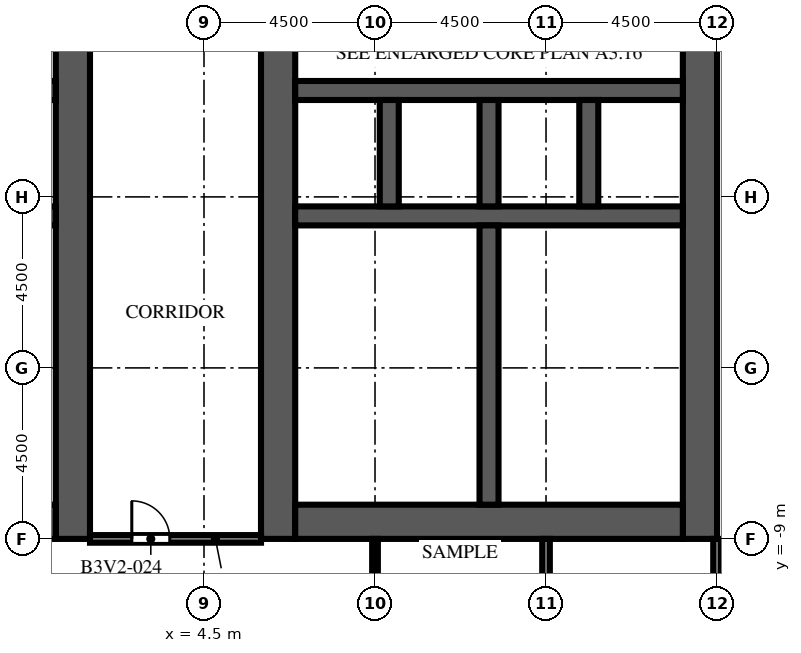
"""IFC4 building model, lengths in metres.
Left out: names, types, materials, properties, quantities, classifications, styles, units other than length and angle.
Written with IfcOpenShell. Run it as: python <this file> out.ifc"""

import sys

from ifc_helpers import new_model, si_unit, direction, frame, frame_2d, origin, place, context, subcontext, project, spatial, rectangle, extrude, element, fill, save


model = new_model("IFC4")
c1 = context("Model", 3, precision=1e-05, world=origin(), true_north=direction((0.0, 1.0)))
c2 = subcontext(c1, "Body", "Model", "MODEL_VIEW")
j1 = project(units=[si_unit("LENGTHUNIT", "METRE"), si_unit("PLANEANGLEUNIT", "RADIAN")], contexts=[c1])
p1 = place(None, origin())
s1 = spatial("IfcSite", under=j1, at=p1, CompositionType="ELEMENT")
p2 = place(p1, origin())
s2 = spatial("IfcBuilding", under=s1, at=p2, CompositionType="ELEMENT")
p3 = place(p2, frame((0.0, 0.0, 102.5)))
s3 = spatial("IfcBuildingStorey", under=s2, at=p3, CompositionType="ELEMENT", Elevation=102.5)
p4 = place(p3, frame((1.05, -9.0, 0.0), z_axis=(0.0, 0.0, 1.0), x_axis=(0.0, 1.0, 0.0)))
e1 = element("IfcWall", 1, at=p4, inside=s3, PredefinedType="SHEAR", context=c2, shape_type="SweptSolid", body=[
    extrude(rectangle(XDim=27.5, YDim=0.9, at=frame_2d((13.75, 0.0))), origin(), (0.0, 0.0, 1.0), 4.1),
])
p5 = place(p4, frame((12.55, 0.0, 0.0)))
e2 = element("IfcOpeningElement", 2, at=p5, cuts=e1, PredefinedType="OPENING", context=c2, shape_type="SweptSolid", body=[
    extrude(rectangle(XDim=2.4, YDim=2.4, at=frame_2d((1.2, 1.2))), frame((0.0, 0.46, 0.0), z_axis=(0.0, -1.0, 0.0), x_axis=(1.0, 0.0, 0.0)), (0.0, 0.0, 1.0), 0.92),
])
p6 = place(p4, frame((3.893, 0.0, 0.0)))
e3 = element("IfcOpeningElement", 3, at=p6, cuts=e1, PredefinedType="OPENING", context=c2, shape_type="SweptSolid", body=[
    extrude(rectangle(XDim=0.923, YDim=2.1, at=frame_2d((0.461, 1.05))), frame((0.0, 0.46, 0.0), z_axis=(0.0, -1.0, 0.0), x_axis=(1.0, 0.0, 0.0)), (0.0, 0.0, 1.0), 0.92),
])
p7 = place(p4, frame((23.427, 0.0, 0.0)))
e4 = element("IfcOpeningElement", 4, at=p7, cuts=e1, PredefinedType="OPENING", context=c2, shape_type="SweptSolid", body=[
    extrude(rectangle(XDim=1.2, YDim=2.1, at=frame_2d((0.6, 1.05))), frame((0.0, 0.46, 0.0), z_axis=(0.0, -1.0, 0.0), x_axis=(1.0, 0.0, 0.0)), (0.0, 0.0, 1.0), 0.92),
])
p8 = place(p3, frame((-9.6, -8.55, 0.0), z_axis=(0.0, 0.0, 1.0), x_axis=(1.0, 0.0, 0.0)))
e5 = element("IfcWall", 5, at=p8, inside=s3, PredefinedType="SHEAR", context=c2, shape_type="SweptSolid", body=[
    extrude(rectangle(XDim=10.2, YDim=0.9, at=frame_2d((5.1, 0.0))), origin(), (0.0, 0.0, 1.0), 4.1),
])
p9 = place(p3, frame((-9.6, -0.5, 0.0), z_axis=(0.0, 0.0, 1.0), x_axis=(1.0, 0.0, 0.0)))
e6 = element("IfcWall", 6, at=p9, inside=s3, PredefinedType="SHEAR", context=c2, shape_type="SweptSolid", body=[
    extrude(rectangle(XDim=10.2, YDim=0.5, at=frame_2d((5.1, 0.0))), origin(), (0.0, 0.0, 1.0), 4.1),
])
p10 = place(p3, frame((-9.6, 2.8, 0.0), z_axis=(0.0, 0.0, 1.0), x_axis=(1.0, 0.0, 0.0)))
e7 = element("IfcWall", 7, at=p10, inside=s3, PredefinedType="SHEAR", context=c2, shape_type="SweptSolid", body=[
    extrude(rectangle(XDim=10.2, YDim=0.5, at=frame_2d((5.1, 0.0))), origin(), (0.0, 0.0, 1.0), 4.1),
])
p11 = place(p10, frame((0.562, 0.0, 0.0)))
e8 = element("IfcOpeningElement", 8, at=p11, cuts=e7, PredefinedType="OPENING", context=c2, shape_type="SweptSolid", body=[
    extrude(rectangle(XDim=1.1, YDim=2.1, at=frame_2d((0.55, 1.05))), frame((0.0, 0.26, 0.0), z_axis=(0.0, -1.0, 0.0), x_axis=(1.0, 0.0, 0.0)), (0.0, 0.0, 1.0), 0.52),
])
p12 = place(p10, frame((3.238, 0.0, 0.0)))
e9 = element("IfcOpeningElement", 9, at=p12, cuts=e7, PredefinedType="OPENING", context=c2, shape_type="SweptSolid", body=[
    extrude(rectangle(XDim=1.1, YDim=2.1, at=frame_2d((0.55, 1.05))), frame((0.0, 0.26, 0.0), z_axis=(0.0, -1.0, 0.0), x_axis=(1.0, 0.0, 0.0)), (0.0, 0.0, 1.0), 0.52),
])
p13 = place(p10, frame((8.538, 0.0, 0.0)))
e10 = element("IfcOpeningElement", 10, at=p13, cuts=e7, PredefinedType="OPENING", context=c2, shape_type="SweptSolid", body=[
    extrude(rectangle(XDim=1.1, YDim=2.1, at=frame_2d((0.55, 1.05))), frame((0.0, 0.26, 0.0), z_axis=(0.0, -1.0, 0.0), x_axis=(1.0, 0.0, 0.0)), (0.0, 0.0, 1.0), 0.52),
])
p14 = place(p3, frame((6.45, -9.0, 0.0), z_axis=(0.0, 0.0, 1.0), x_axis=(0.0, 1.0, 0.0)))
e11 = element("IfcWall", 11, at=p14, inside=s3, PredefinedType="SHEAR", context=c2, shape_type="SweptSolid", body=[
    extrude(rectangle(XDim=27.5, YDim=0.9, at=frame_2d((13.75, 0.0))), origin(), (0.0, 0.0, 1.0), 4.1),
])
p15 = place(p14, frame((12.55, 0.0, 0.0)))
e12 = element("IfcOpeningElement", 12, at=p15, cuts=e11, PredefinedType="OPENING", context=c2, shape_type="SweptSolid", body=[
    extrude(rectangle(XDim=2.4, YDim=2.4, at=frame_2d((1.2, 1.2))), frame((0.0, 0.46, 0.0), z_axis=(0.0, -1.0, 0.0), x_axis=(1.0, 0.0, 0.0)), (0.0, 0.0, 1.0), 0.92),
])
p16 = place(p14, frame((3.893, 0.0, 0.0)))
e13 = element("IfcOpeningElement", 13, at=p16, cuts=e11, PredefinedType="OPENING", context=c2, shape_type="SweptSolid", body=[
    extrude(rectangle(XDim=0.923, YDim=2.1, at=frame_2d((0.461, 1.05))), frame((0.0, 0.46, 0.0), z_axis=(0.0, -1.0, 0.0), x_axis=(1.0, 0.0, 0.0)), (0.0, 0.0, 1.0), 0.92),
])
p17 = place(p14, frame((23.427, 0.0, 0.0)))
e14 = element("IfcOpeningElement", 14, at=p17, cuts=e11, PredefinedType="OPENING", context=c2, shape_type="SweptSolid", body=[
    extrude(rectangle(XDim=1.2, YDim=2.1, at=frame_2d((0.6, 1.05))), frame((0.0, 0.46, 0.0), z_axis=(0.0, -1.0, 0.0), x_axis=(1.0, 0.0, 0.0)), (0.0, 0.0, 1.0), 0.92),
])
p18 = place(p3, frame((17.55, -9.0, 0.0), z_axis=(0.0, 0.0, 1.0), x_axis=(0.0, 1.0, 0.0)))
e15 = element("IfcWall", 15, at=p18, inside=s3, PredefinedType="SHEAR", context=c2, shape_type="SweptSolid", body=[
    extrude(rectangle(XDim=27.5, YDim=0.9, at=frame_2d((13.75, 0.0))), origin(), (0.0, 0.0, 1.0), 4.1),
])
p19 = place(p18, frame((12.55, 0.0, 0.0)))
e16 = element("IfcOpeningElement", 16, at=p19, cuts=e15, PredefinedType="OPENING", context=c2, shape_type="SweptSolid", body=[
    extrude(rectangle(XDim=2.4, YDim=2.4, at=frame_2d((1.2, 1.2))), frame((0.0, 0.46, 0.0), z_axis=(0.0, -1.0, 0.0), x_axis=(1.0, 0.0, 0.0)), (0.0, 0.0, 1.0), 0.92),
])
p20 = place(p18, frame((6.825, 0.0, 0.0)))
e17 = element("IfcOpeningElement", 17, at=p20, cuts=e15, PredefinedType="OPENING", context=c2, shape_type="SweptSolid", body=[
    extrude(rectangle(XDim=1.2, YDim=2.1, at=frame_2d((0.6, 1.05))), frame((0.0, 0.46, 0.0), z_axis=(0.0, -1.0, 0.0), x_axis=(1.0, 0.0, 0.0)), (0.0, 0.0, 1.0), 0.92),
])
p21 = place(p18, frame((19.475, 0.0, 0.0)))
e18 = element("IfcOpeningElement", 18, at=p21, cuts=e15, PredefinedType="OPENING", context=c2, shape_type="SweptSolid", body=[
    extrude(rectangle(XDim=1.2, YDim=2.1, at=frame_2d((0.6, 1.05))), frame((0.0, 0.46, 0.0), z_axis=(0.0, -1.0, 0.0), x_axis=(1.0, 0.0, 0.0)), (0.0, 0.0, 1.0), 0.92),
])
p22 = place(p3, frame((6.9, -8.55, 0.0), z_axis=(0.0, 0.0, 1.0), x_axis=(1.0, 0.0, 0.0)))
e19 = element("IfcWall", 19, at=p22, inside=s3, PredefinedType="SHEAR", context=c2, shape_type="SweptSolid", body=[
    extrude(rectangle(XDim=10.2, YDim=0.9, at=frame_2d((5.1, 0.0))), origin(), (0.0, 0.0, 1.0), 4.1),
])
p23 = place(p3, frame((6.9, -0.5, 0.0), z_axis=(0.0, 0.0, 1.0), x_axis=(1.0, 0.0, 0.0)))
e20 = element("IfcWall", 20, at=p23, inside=s3, PredefinedType="SHEAR", context=c2, shape_type="SweptSolid", body=[
    extrude(rectangle(XDim=10.2, YDim=0.5, at=frame_2d((5.1, 0.0))), origin(), (0.0, 0.0, 1.0), 4.1),
])
p24 = place(p3, frame((6.9, 2.8, 0.0), z_axis=(0.0, 0.0, 1.0), x_axis=(1.0, 0.0, 0.0)))
e21 = element("IfcWall", 21, at=p24, inside=s3, PredefinedType="SHEAR", context=c2, shape_type="SweptSolid", body=[
    extrude(rectangle(XDim=10.2, YDim=0.5, at=frame_2d((5.1, 0.0))), origin(), (0.0, 0.0, 1.0), 4.1),
])
p25 = place(p24, frame((0.562, 0.0, 0.0)))
e22 = element("IfcOpeningElement", 22, at=p25, cuts=e21, PredefinedType="OPENING", context=c2, shape_type="SweptSolid", body=[
    extrude(rectangle(XDim=1.1, YDim=2.1, at=frame_2d((0.55, 1.05))), frame((0.0, 0.26, 0.0), z_axis=(0.0, -1.0, 0.0), x_axis=(1.0, 0.0, 0.0)), (0.0, 0.0, 1.0), 0.52),
])
p26 = place(p24, frame((3.238, 0.0, 0.0)))
e23 = element("IfcOpeningElement", 23, at=p26, cuts=e21, PredefinedType="OPENING", context=c2, shape_type="SweptSolid", body=[
    extrude(rectangle(XDim=1.1, YDim=2.1, at=frame_2d((0.55, 1.05))), frame((0.0, 0.26, 0.0), z_axis=(0.0, -1.0, 0.0), x_axis=(1.0, 0.0, 0.0)), (0.0, 0.0, 1.0), 0.52),
])
p27 = place(p24, frame((8.538, 0.0, 0.0)))
e24 = element("IfcOpeningElement", 24, at=p27, cuts=e21, PredefinedType="OPENING", context=c2, shape_type="SweptSolid", body=[
    extrude(rectangle(XDim=1.1, YDim=2.1, at=frame_2d((0.55, 1.05))), frame((0.0, 0.26, 0.0), z_axis=(0.0, -1.0, 0.0), x_axis=(1.0, 0.0, 0.0)), (0.0, 0.0, 1.0), 0.52),
])
for number, where, z_axis, x_axis in (
    (25, (9.375, -0.25, 0.0), (0.0, 0.0, 1.0), (0.0, 1.0, 0.0)),
    (26, (12.0, -0.25, 0.0), (0.0, 0.0, 1.0), (0.0, 1.0, 0.0)),
    (27, (14.625, -0.25, 0.0), (0.0, 0.0, 1.0), (0.0, 1.0, 0.0)),
):
    element("IfcWall", number, at=place(p3, frame(where, z_axis=z_axis, x_axis=x_axis)), inside=s3, PredefinedType="SHEAR", context=c2, shape_type="SweptSolid", body=[
        extrude(rectangle(XDim=2.8, YDim=0.5, at=frame_2d((1.4, 0.0))), origin(), (0.0, 0.0, 1.0), 4.1),
    ])
p28 = place(p3, frame((12.0, -8.1, 0.0), z_axis=(0.0, 0.0, 1.0), x_axis=(0.0, 1.0, 0.0)))
e28 = element("IfcWall", 28, at=p28, inside=s3, PredefinedType="SHEAR", context=c2, shape_type="SweptSolid", body=[
    extrude(rectangle(XDim=7.35, YDim=0.5, at=frame_2d((3.675, 0.0))), origin(), (0.0, 0.0, 1.0), 4.1),
])
p29 = place(p3, frame((-4.25, -5.307, 0.0), z_axis=(0.0, 0.0, 1.0), x_axis=(1.0, 0.0, 0.0)))
e29 = element("IfcWall", 29, at=p29, inside=s3, PredefinedType="PARTITIONING", context=c2, shape_type="SweptSolid", body=[
    extrude(rectangle(XDim=4.85, YDim=0.1, at=frame_2d((2.425, 0.0))), origin(), (0.0, 0.0, 1.0), 3.65),
])
p30 = place(p29, frame((1.925, 0.0, 0.0)))
e30 = element("IfcOpeningElement", 30, at=p30, cuts=e29, PredefinedType="OPENING", context=c2, shape_type="SweptSolid", body=[
    extrude(rectangle(XDim=1.0, YDim=2.1, at=frame_2d((0.5, 1.05))), frame((0.0, 0.06, 0.0), z_axis=(0.0, -1.0, 0.0), x_axis=(1.0, 0.0, 0.0)), (0.0, 0.0, 1.0), 0.12),
])
p31 = place(p3, frame((-2.407, -3.984, 0.0), z_axis=(0.0, 0.0, 1.0), x_axis=(1.0, 0.0, 0.0)))
e31 = element("IfcWall", 31, at=p31, inside=s3, PredefinedType="PARTITIONING", context=c2, shape_type="SweptSolid", body=[
    extrude(rectangle(XDim=3.007, YDim=0.1, at=frame_2d((1.503, 0.0))), origin(), (0.0, 0.0, 1.0), 3.65),
])
p32 = place(p31, frame((1.003, 0.0, 0.0)))
e32 = element("IfcOpeningElement", 32, at=p32, cuts=e31, PredefinedType="OPENING", context=c2, shape_type="SweptSolid", body=[
    extrude(rectangle(XDim=1.0, YDim=2.1, at=frame_2d((0.5, 1.05))), frame((0.0, 0.06, 0.0), z_axis=(0.0, -1.0, 0.0), x_axis=(1.0, 0.0, 0.0)), (0.0, 0.0, 1.0), 0.12),
])
p33 = place(p3, frame((6.9, -5.307, 0.0), z_axis=(0.0, 0.0, 1.0), x_axis=(1.0, 0.0, 0.0)))
e33 = element("IfcWall", 33, at=p33, inside=s3, PredefinedType="PARTITIONING", context=c2, shape_type="SweptSolid", body=[
    extrude(rectangle(XDim=4.85, YDim=0.1, at=frame_2d((2.425, 0.0))), origin(), (0.0, 0.0, 1.0), 3.65),
])
p34 = place(p33, frame((1.925, 0.0, 0.0)))
e34 = element("IfcOpeningElement", 34, at=p34, cuts=e33, PredefinedType="OPENING", context=c2, shape_type="SweptSolid", body=[
    extrude(rectangle(XDim=1.0, YDim=2.1, at=frame_2d((0.5, 1.05))), frame((0.0, 0.06, 0.0), z_axis=(0.0, -1.0, 0.0), x_axis=(1.0, 0.0, 0.0)), (0.0, 0.0, 1.0), 0.12),
])
p35 = place(p3, frame((6.9, -3.984, 0.0), z_axis=(0.0, 0.0, 1.0), x_axis=(1.0, 0.0, 0.0)))
e35 = element("IfcWall", 35, at=p35, inside=s3, PredefinedType="PARTITIONING", context=c2, shape_type="SweptSolid", body=[
    extrude(rectangle(XDim=3.007, YDim=0.1, at=frame_2d((1.503, 0.0))), origin(), (0.0, 0.0, 1.0), 3.65),
])
p36 = place(p35, frame((1.003, 0.0, 0.0)))
e36 = element("IfcOpeningElement", 36, at=p36, cuts=e35, PredefinedType="OPENING", context=c2, shape_type="SweptSolid", body=[
    extrude(rectangle(XDim=1.0, YDim=2.1, at=frame_2d((0.5, 1.05))), frame((0.0, 0.06, 0.0), z_axis=(0.0, -1.0, 0.0), x_axis=(1.0, 0.0, 0.0)), (0.0, 0.0, 1.0), 0.12),
])
p37 = place(p3, frame((9.907, -3.984, 0.0), z_axis=(0.0, 0.0, 1.0), x_axis=(1.0, 0.0, 0.0)))
e37 = element("IfcWall", 37, at=p37, inside=s3, PredefinedType="PARTITIONING", context=c2, shape_type="SweptSolid", body=[
    extrude(rectangle(XDim=1.843, YDim=0.1, at=frame_2d((0.921, 0.0))), origin(), (0.0, 0.0, 1.0), 3.65),
])
p38 = place(p37, frame((0.421, 0.0, 0.0)))
e38 = element("IfcOpeningElement", 38, at=p38, cuts=e37, PredefinedType="OPENING", context=c2, shape_type="SweptSolid", body=[
    extrude(rectangle(XDim=1.0, YDim=2.1, at=frame_2d((0.5, 1.05))), frame((0.0, 0.06, 0.0), z_axis=(0.0, -1.0, 0.0), x_axis=(1.0, 0.0, 0.0)), (0.0, 0.0, 1.0), 0.12),
])
p39 = place(p3, frame((9.907, -3.984, 0.0), z_axis=(0.0, 0.0, 1.0), x_axis=(0.0, 1.0, 0.0)))
e39 = element("IfcWall", 39, at=p39, inside=s3, PredefinedType="PARTITIONING", context=c2, shape_type="SweptSolid", body=[
    extrude(rectangle(XDim=3.234, YDim=0.1, at=frame_2d((1.617, 0.0))), origin(), (0.0, 0.0, 1.0), 3.65),
])
p40 = place(p3, frame((9.0, -17.3, 0.0), z_axis=(0.0, 0.0, 1.0), x_axis=(0.0, 1.0, 0.0)))
e40 = element("IfcWall", 40, at=p40, inside=s3, PredefinedType="PARTITIONING", context=c2, shape_type="SweptSolid", body=[
    extrude(rectangle(XDim=8.3, YDim=0.15, at=frame_2d((4.15, 0.0))), origin(), (0.0, 0.0, 1.0), 3.65),
])
p41 = place(p3, frame((13.5, -21.9, 0.0), z_axis=(0.0, 0.0, 1.0), x_axis=(0.0, 1.0, 0.0)))
e41 = element("IfcWall", 41, at=p41, inside=s3, PredefinedType="PARTITIONING", context=c2, shape_type="SweptSolid", body=[
    extrude(rectangle(XDim=12.9, YDim=0.2, at=frame_2d((6.45, 0.0))), origin(), (0.0, 0.0, 1.0), 3.65),
])
p42 = place(p3, frame((18.0, -17.3, 0.0), z_axis=(0.0, 0.0, 1.0), x_axis=(0.0, 1.0, 0.0)))
e42 = element("IfcWall", 42, at=p42, inside=s3, PredefinedType="PARTITIONING", context=c2, shape_type="SweptSolid", body=[
    extrude(rectangle(XDim=8.3, YDim=0.2, at=frame_2d((4.15, 0.0))), origin(), (0.0, 0.0, 1.0), 3.65),
])
p43 = place(p42, frame((0.15, 0.0, 0.0)))
e43 = element("IfcOpeningElement", 43, at=p43, cuts=e42, PredefinedType="OPENING", context=c2, shape_type="SweptSolid", body=[
    extrude(rectangle(XDim=1.0, YDim=2.1, at=frame_2d((0.5, 1.05))), frame((0.0, 0.11, 0.0), z_axis=(0.0, -1.0, 0.0), x_axis=(1.0, 0.0, 0.0)), (0.0, 0.0, 1.0), 0.22),
])
p44 = place(p3, frame((6.0, -9.0, 0.0), z_axis=(0.0, 0.0, 1.0), x_axis=(-1.0, 0.0, 0.0)))
e44 = element("IfcWall", 44, at=p44, inside=s3, PredefinedType="PARTITIONING", context=c2, shape_type="SweptSolid", body=[
    extrude(rectangle(XDim=4.5, YDim=0.2, at=frame_2d((2.25, 0.0))), origin(), (0.0, 0.0, 1.0), 3.65),
])
p45 = place(p44, frame((2.4, 0.0, 0.0)))
e45 = element("IfcOpeningElement", 45, at=p45, cuts=e44, PredefinedType="OPENING", context=c2, shape_type="SweptSolid", body=[
    extrude(rectangle(XDim=1.0, YDim=2.1, at=frame_2d((0.5, 1.05))), frame((0.0, 0.11, 0.0), z_axis=(0.0, -1.0, 0.0), x_axis=(1.0, 0.0, 0.0)), (0.0, 0.0, 1.0), 0.22),
])
p46 = place(p25, origin())
e46 = element("IfcDoor", 46, at=p46, inside=s3, OperationType="DOUBLE_DOOR_SLIDING", PredefinedType="DOOR", context=c2, shape_type="SweptSolid", body=[
    extrude(rectangle(XDim=1.1, YDim=2.1, at=frame_2d((0.55, 1.05))), frame((0.0, 0.025, 0.0), z_axis=(0.0, -1.0, 0.0), x_axis=(1.0, 0.0, 0.0)), (0.0, 0.0, 1.0), 0.05),
])
fill(e22, e46)
p47 = place(p26, origin())
e47 = element("IfcDoor", 47, at=p47, inside=s3, OperationType="DOUBLE_DOOR_SLIDING", PredefinedType="DOOR", context=c2, shape_type="SweptSolid", body=[
    extrude(rectangle(XDim=1.1, YDim=2.1, at=frame_2d((0.55, 1.05))), frame((0.0, 0.025, 0.0), z_axis=(0.0, -1.0, 0.0), x_axis=(1.0, 0.0, 0.0)), (0.0, 0.0, 1.0), 0.05),
])
fill(e23, e47)
p48 = place(p27, origin())
e48 = element("IfcDoor", 48, at=p48, inside=s3, OperationType="DOUBLE_DOOR_SLIDING", PredefinedType="DOOR", context=c2, shape_type="SweptSolid", body=[
    extrude(rectangle(XDim=1.1, YDim=2.1, at=frame_2d((0.55, 1.05))), frame((0.0, 0.025, 0.0), z_axis=(0.0, -1.0, 0.0), x_axis=(1.0, 0.0, 0.0)), (0.0, 0.0, 1.0), 0.05),
])
fill(e24, e48)
p49 = place(p5, origin())
e49 = element("IfcDoor", 49, at=p49, inside=s3, OperationType="DOUBLE_DOOR_DOUBLE_SWING", PredefinedType="DOOR", context=c2, shape_type="SweptSolid", body=[
    extrude(rectangle(XDim=2.4, YDim=2.4, at=frame_2d((1.2, 1.2))), frame((0.0, 0.025, 0.0), z_axis=(0.0, -1.0, 0.0), x_axis=(1.0, 0.0, 0.0)), (0.0, 0.0, 1.0), 0.05),
])
fill(e2, e49)
p50 = place(p15, origin())
e50 = element("IfcDoor", 50, at=p50, inside=s3, OperationType="DOUBLE_DOOR_DOUBLE_SWING", PredefinedType="DOOR", context=c2, shape_type="SweptSolid", body=[
    extrude(rectangle(XDim=2.4, YDim=2.4, at=frame_2d((1.2, 1.2))), frame((0.0, 0.025, 0.0), z_axis=(0.0, -1.0, 0.0), x_axis=(1.0, 0.0, 0.0)), (0.0, 0.0, 1.0), 0.05),
])
fill(e12, e50)
p51 = place(p19, origin())
e51 = element("IfcDoor", 51, at=p51, inside=s3, OperationType="DOUBLE_DOOR_DOUBLE_SWING", PredefinedType="DOOR", context=c2, shape_type="SweptSolid", body=[
    extrude(rectangle(XDim=2.4, YDim=2.4, at=frame_2d((1.2, 1.2))), frame((0.0, 0.025, 0.0), z_axis=(0.0, -1.0, 0.0), x_axis=(1.0, 0.0, 0.0)), (0.0, 0.0, 1.0), 0.05),
])
fill(e16, e51)
p52 = place(p20, frame((1.2, 0.0, 0.0), z_axis=(0.0, 0.0, 1.0), x_axis=(-1.0, 0.0, 0.0)))
e52 = element("IfcDoor", 52, at=p52, inside=s3, OperationType="SINGLE_SWING_LEFT", PredefinedType="DOOR", context=c2, shape_type="SweptSolid", body=[
    extrude(rectangle(XDim=1.2, YDim=2.1, at=frame_2d((0.6, 1.05))), frame((0.0, 0.025, 0.0), z_axis=(0.0, -1.0, 0.0), x_axis=(1.0, 0.0, 0.0)), (0.0, 0.0, 1.0), 0.05),
])
fill(e17, e52)
p53 = place(p6, origin())
e53 = element("IfcDoor", 53, at=p53, inside=s3, OperationType="SINGLE_SWING_LEFT", PredefinedType="DOOR", context=c2, shape_type="SweptSolid", body=[
    extrude(rectangle(XDim=0.923, YDim=2.1, at=frame_2d((0.461, 1.05))), frame((0.0, 0.425, 0.0), z_axis=(0.0, -1.0, 0.0), x_axis=(1.0, 0.0, 0.0)), (0.0, 0.0, 1.0), 0.05),
])
fill(e3, e53)
p54 = place(p16, origin())
e54 = element("IfcDoor", 54, at=p54, inside=s3, OperationType="SINGLE_SWING_RIGHT", PredefinedType="DOOR", context=c2, shape_type="SweptSolid", body=[
    extrude(rectangle(XDim=0.923, YDim=2.1, at=frame_2d((0.461, 1.05))), frame((0.0, -0.375, 0.0), z_axis=(0.0, -1.0, 0.0), x_axis=(1.0, 0.0, 0.0)), (0.0, 0.0, 1.0), 0.05),
])
fill(e13, e54)
p55 = place(p34, origin())
e55 = element("IfcDoor", 55, at=p55, inside=s3, OperationType="SINGLE_SWING_LEFT", PredefinedType="DOOR", context=c2, shape_type="SweptSolid", body=[
    extrude(rectangle(XDim=1.0, YDim=2.1, at=frame_2d((0.5, 1.05))), frame((0.0, 0.025, 0.0), z_axis=(0.0, -1.0, 0.0), x_axis=(1.0, 0.0, 0.0)), (0.0, 0.0, 1.0), 0.05),
])
fill(e34, e55)
p56 = place(p36, origin())
e56 = element("IfcDoor", 56, at=p56, inside=s3, OperationType="SINGLE_SWING_RIGHT", PredefinedType="DOOR", context=c2, shape_type="SweptSolid", body=[
    extrude(rectangle(XDim=1.0, YDim=2.1, at=frame_2d((0.5, 1.05))), frame((0.0, 0.025, 0.0), z_axis=(0.0, -1.0, 0.0), x_axis=(1.0, 0.0, 0.0)), (0.0, 0.0, 1.0), 0.05),
])
fill(e36, e56)
p57 = place(p38, origin())
e57 = element("IfcDoor", 57, at=p57, inside=s3, OperationType="SINGLE_SWING_LEFT", PredefinedType="DOOR", context=c2, shape_type="SweptSolid", body=[
    extrude(rectangle(XDim=1.0, YDim=2.1, at=frame_2d((0.5, 1.05))), frame((0.0, 0.025, 0.0), z_axis=(0.0, -1.0, 0.0), x_axis=(1.0, 0.0, 0.0)), (0.0, 0.0, 1.0), 0.05),
])
fill(e38, e57)
p58 = place(p45, origin())
e58 = element("IfcDoor", 58, at=p58, inside=s3, OperationType="SINGLE_SWING_RIGHT", PredefinedType="DOOR", context=c2, shape_type="SweptSolid", body=[
    extrude(rectangle(XDim=1.0, YDim=2.1, at=frame_2d((0.5, 1.05))), frame((0.0, 0.025, 0.0), z_axis=(0.0, -1.0, 0.0), x_axis=(1.0, 0.0, 0.0)), (0.0, 0.0, 1.0), 0.05),
])
fill(e45, e58)
save(model, sys.argv[1])
